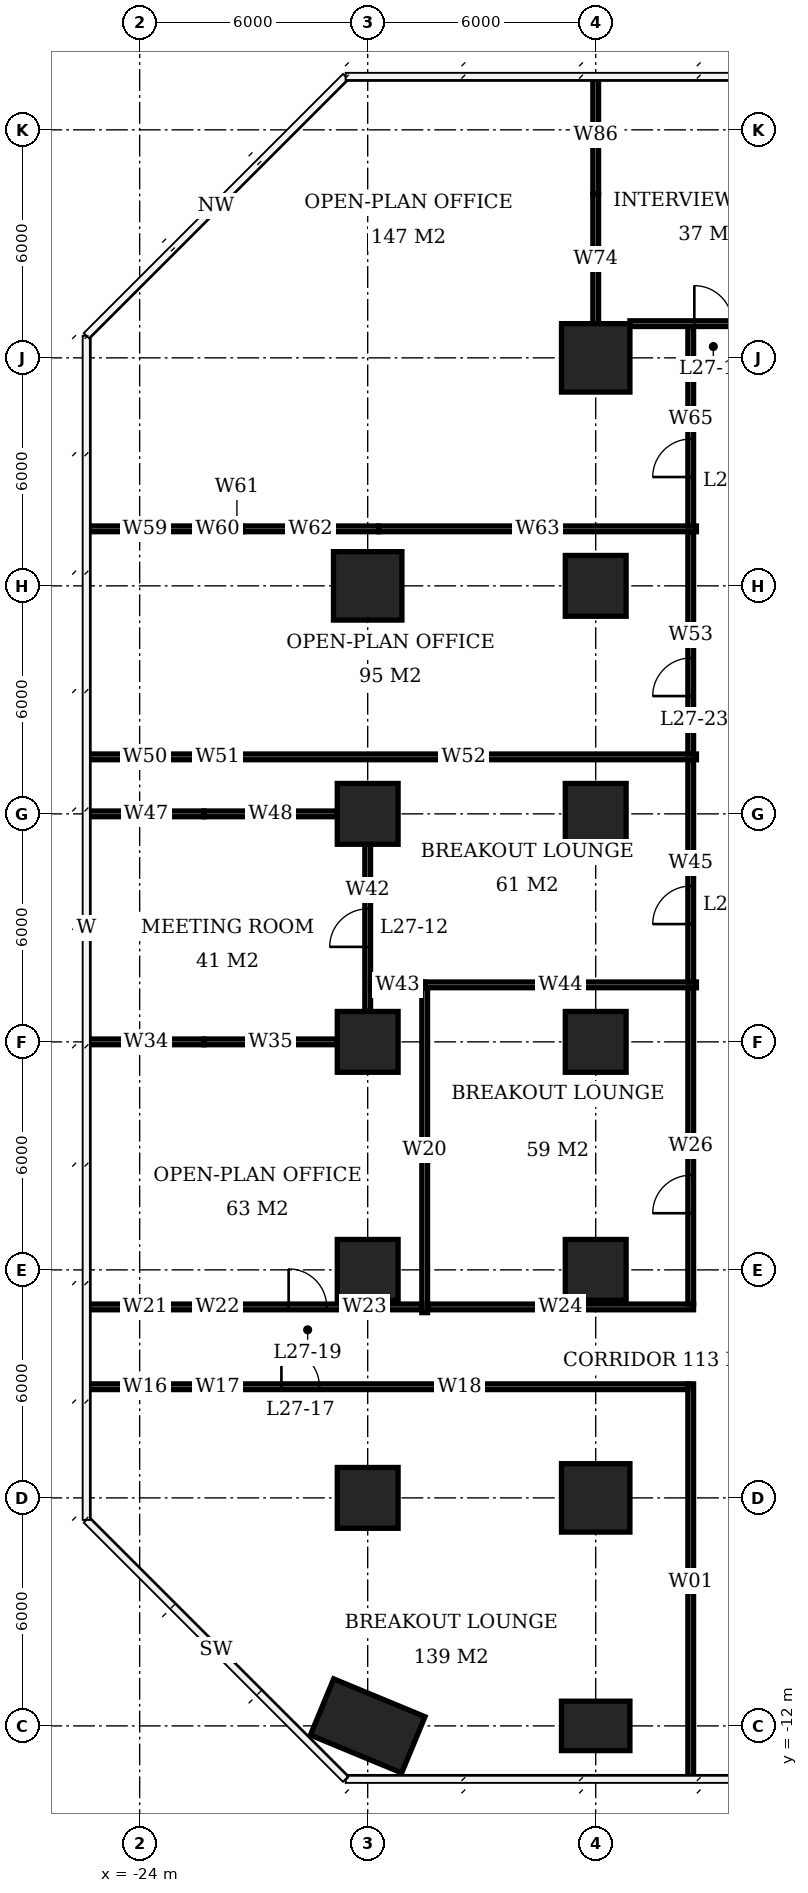
"""IFC4 building model, lengths in metres.
Left out: names, types, materials, properties, quantities, classifications, styles, units other than length and angle.
Written with IfcOpenShell. Run it as: python <this file> out.ifc"""

import sys

from ifc_helpers import new_model, si_unit, direction, frame, frame_2d, origin, origin_2d, place, context, subcontext, project, spatial, rectangle, extrude, element, fill, save


model = new_model("IFC4")
c1 = context("Model", 3, precision=1e-05, world=origin(), true_north=direction((0.0, 1.0)))
c2 = subcontext(c1, "Body", "Model", "MODEL_VIEW")
j1 = project(units=[si_unit("LENGTHUNIT", "METRE"), si_unit("PLANEANGLEUNIT", "RADIAN")], contexts=[c1])
p1 = place(None, origin())
s1 = spatial("IfcSite", under=j1, at=p1, CompositionType="ELEMENT")
p2 = place(p1, origin())
s2 = spatial("IfcBuilding", under=s1, at=p2, CompositionType="ELEMENT")
p3 = place(p2, frame((0.0, 0.0, 113.3)))
s3 = spatial("IfcBuildingStorey", under=s2, at=p3, CompositionType="ELEMENT", Elevation=113.3)
p4 = place(p3, frame((-18.0, -12.0, 0.0), z_axis=(0.0, 0.0, 1.0), x_axis=(-0.923879532511, 0.382683432365, 0.0)))
e1 = element("IfcColumn", 1, at=p4, inside=s3, PredefinedType="COLUMN", context=c2, shape_type="SweptSolid", body=[
    extrude(rectangle(XDim=2.6, YDim=1.6, at=origin_2d()), origin(), (0.0, 0.0, 1.0), 3.9),
])
for number, where, z_axis, x_axis in (
    (2, (-18.0, -6.0, 0.0), (0.0, 0.0, 1.0), (1.0, 0.0, 0.0)),
    (3, (-18.0, 0.0, 0.0), (0.0, 0.0, 1.0), (1.0, 0.0, 0.0)),
    (4, (-18.0, 6.0, 0.0), (0.0, 0.0, 1.0), (1.0, 0.0, 0.0)),
    (5, (-18.0, 12.0, 0.0), (0.0, 0.0, 1.0), (1.0, 0.0, 0.0)),
):
    element("IfcColumn", number, at=place(p3, frame(where, z_axis=z_axis, x_axis=x_axis)), inside=s3, PredefinedType="COLUMN", context=c2, shape_type="SweptSolid", body=[
        extrude(rectangle(XDim=1.6, YDim=1.6, at=origin_2d()), origin(), (0.0, 0.0, 1.0), 3.9),
    ])
p5 = place(p3, frame((-18.0, 18.0, 0.0), z_axis=(0.0, 0.0, 1.0), x_axis=(1.0, 0.0, 0.0)))
e6 = element("IfcColumn", 6, at=p5, inside=s3, PredefinedType="COLUMN", context=c2, shape_type="SweptSolid", body=[
    extrude(rectangle(XDim=1.8, YDim=1.8, at=origin_2d()), origin(), (0.0, 0.0, 1.0), 3.9),
])
p6 = place(p3, frame((-12.0, -12.0, 0.0), z_axis=(0.0, 0.0, 1.0), x_axis=(1.0, 0.0, 0.0)))
e7 = element("IfcColumn", 7, at=p6, inside=s3, PredefinedType="COLUMN", context=c2, shape_type="SweptSolid", body=[
    extrude(rectangle(XDim=1.8, YDim=1.3, at=origin_2d()), origin(), (0.0, 0.0, 1.0), 3.9),
])
p7 = place(p3, frame((-12.0, -6.0, 0.0), z_axis=(0.0, 0.0, 1.0), x_axis=(1.0, 0.0, 0.0)))
e8 = element("IfcColumn", 8, at=p7, inside=s3, PredefinedType="COLUMN", context=c2, shape_type="SweptSolid", body=[
    extrude(rectangle(XDim=1.8, YDim=1.8, at=origin_2d()), origin(), (0.0, 0.0, 1.0), 3.9),
])
for number, where, z_axis, x_axis in (
    (9, (-12.0, 0.0, 0.0), (0.0, 0.0, 1.0), (1.0, 0.0, 0.0)),
    (10, (-12.0, 6.0, 0.0), (0.0, 0.0, 1.0), (1.0, 0.0, 0.0)),
    (11, (-12.0, 12.0, 0.0), (0.0, 0.0, 1.0), (1.0, 0.0, 0.0)),
    (12, (-12.0, 18.0, 0.0), (0.0, 0.0, 1.0), (1.0, 0.0, 0.0)),
):
    element("IfcColumn", number, at=place(p3, frame(where, z_axis=z_axis, x_axis=x_axis)), inside=s3, PredefinedType="COLUMN", context=c2, shape_type="SweptSolid", body=[
        extrude(rectangle(XDim=1.6, YDim=1.6, at=origin_2d()), origin(), (0.0, 0.0, 1.0), 3.9),
    ])
p8 = place(p3, frame((-12.0, 24.0, 0.0), z_axis=(0.0, 0.0, 1.0), x_axis=(1.0, 0.0, 0.0)))
e13 = element("IfcColumn", 13, at=p8, inside=s3, PredefinedType="COLUMN", context=c2, shape_type="SweptSolid", body=[
    extrude(rectangle(XDim=1.8, YDim=1.8, at=origin_2d()), origin(), (0.0, 0.0, 1.0), 3.9),
])
p9 = place(p3, frame((-25.35, 6.0, 0.0), z_axis=(0.0, 0.0, 1.0), x_axis=(1.0, 0.0, 0.0)))
e14 = element("IfcWall", 14, at=p9, inside=s3, PredefinedType="PARTITIONING", context=c2, shape_type="SweptSolid", body=[
    extrude(rectangle(XDim=3.04, YDim=0.15, at=frame_2d((1.52, 0.0))), origin(), (0.0, 0.0, 1.0), 3.65),
])
p10 = place(p3, frame((-22.31, 6.0, 0.0), z_axis=(0.0, 0.0, 1.0), x_axis=(1.0, 0.0, 0.0)))
e15 = element("IfcWall", 15, at=p10, inside=s3, PredefinedType="PARTITIONING", context=c2, shape_type="SweptSolid", body=[
    extrude(rectangle(XDim=3.51, YDim=0.15, at=frame_2d((1.755, 0.0))), origin(), (0.0, 0.0, 1.0), 2.65),
])
p11 = place(p3, frame((-25.35, 12.0, 0.0), z_axis=(0.0, 0.0, 1.0), x_axis=(1.0, 0.0, 0.0)))
e16 = element("IfcWall", 16, at=p11, inside=s3, PredefinedType="PARTITIONING", context=c2, shape_type="SweptSolid", body=[
    extrude(rectangle(XDim=3.04, YDim=0.15, at=frame_2d((1.52, 0.0))), origin(), (0.0, 0.0, 1.0), 3.65),
])
p12 = place(p3, frame((-22.31, 12.0, 0.0), z_axis=(0.0, 0.0, 1.0), x_axis=(1.0, 0.0, 0.0)))
e17 = element("IfcWall", 17, at=p12, inside=s3, PredefinedType="PARTITIONING", context=c2, shape_type="SweptSolid", body=[
    extrude(rectangle(XDim=3.51, YDim=0.15, at=frame_2d((1.755, 0.0))), origin(), (0.0, 0.0, 1.0), 2.65),
])
p13 = place(p3, frame((-11.1, 24.9, 0.0), z_axis=(0.0, 0.0, 1.0), x_axis=(1.0, 0.0, 0.0)))
e18 = element("IfcWall", 18, at=p13, inside=s3, PredefinedType="PARTITIONING", context=c2, shape_type="SweptSolid", body=[
    extrude(rectangle(XDim=4.39, YDim=0.15, at=frame_2d((2.195, 0.0))), origin(), (0.0, 0.0, 1.0), 3.65),
])
p14 = place(p13, frame((1.695, 0.0, 0.0)))
e19 = element("IfcOpeningElement", 19, at=p14, cuts=e18, PredefinedType="OPENING", context=c2, shape_type="SweptSolid", body=[
    extrude(rectangle(XDim=1.0, YDim=2.1, at=frame_2d((0.5, 1.05))), frame((0.0, 0.085, 0.0), z_axis=(0.0, -1.0, 0.0), x_axis=(1.0, 0.0, 0.0)), (0.0, 0.0, 1.0), 0.17),
])
p15 = place(p3, frame((-18.0, 6.8, 0.0), z_axis=(0.0, 0.0, 1.0), x_axis=(0.0, 1.0, 0.0)))
e20 = element("IfcWall", 20, at=p15, inside=s3, PredefinedType="PARTITIONING", context=c2, shape_type="SweptSolid", body=[
    extrude(rectangle(XDim=4.4, YDim=0.15, at=frame_2d((2.2, 0.0))), origin(), (0.0, 0.0, 1.0), 3.65),
])
p16 = place(p15, frame((1.7, 0.0, 0.0)))
e21 = element("IfcOpeningElement", 21, at=p16, cuts=e20, PredefinedType="OPENING", context=c2, shape_type="SweptSolid", body=[
    extrude(rectangle(XDim=1.0, YDim=2.1, at=frame_2d((0.5, 1.05))), frame((0.0, 0.085, 0.0), z_axis=(0.0, -1.0, 0.0), x_axis=(1.0, 0.0, 0.0)), (0.0, 0.0, 1.0), 0.17),
])
p17 = place(p3, frame((-12.0, 24.9, 0.0), z_axis=(0.0, 0.0, 1.0), x_axis=(0.0, 1.0, 0.0)))
e22 = element("IfcWall", 22, at=p17, inside=s3, PredefinedType="PARTITIONING", context=c2, shape_type="SweptSolid", body=[
    extrude(rectangle(XDim=3.41, YDim=0.15, at=frame_2d((1.705, 0.0))), origin(), (0.0, 0.0, 1.0), 2.65),
])
for number, where, z_axis, x_axis in (
    (23, (-12.0, 28.31, 0.0), (0.0, 0.0, 1.0), (0.0, 1.0, 0.0)),
    (24, (-25.4, -3.075, 0.0), (0.0, 0.0, 1.0), (1.0, 0.0, 0.0)),
):
    element("IfcWall", number, at=place(p3, frame(where, z_axis=z_axis, x_axis=x_axis)), inside=s3, PredefinedType="PARTITIONING", context=c2, shape_type="SweptSolid", body=[
        extrude(rectangle(XDim=3.09, YDim=0.15, at=frame_2d((1.545, 0.0))), origin(), (0.0, 0.0, 1.0), 3.65),
    ])
p18 = place(p3, frame((-22.31, -3.075, 0.0), z_axis=(0.0, 0.0, 1.0), x_axis=(1.0, 0.0, 0.0)))
e25 = element("IfcWall", 25, at=p18, inside=s3, PredefinedType="PARTITIONING", context=c2, shape_type="SweptSolid", body=[
    extrude(rectangle(XDim=0.72, YDim=0.15, at=frame_2d((0.36, 0.0))), origin(), (0.0, 0.0, 1.0), 2.65),
])
p19 = place(p3, frame((-21.59, -3.075, 0.0), z_axis=(0.0, 0.0, 1.0), x_axis=(1.0, 0.0, 0.0)))
e26 = element("IfcWall", 26, at=p19, inside=s3, PredefinedType="PARTITIONING", context=c2, shape_type="SweptSolid", body=[
    extrude(rectangle(XDim=12.015, YDim=0.15, at=frame_2d((6.008, 0.0))), origin(), (0.0, 0.0, 1.0), 3.65),
])
p20 = place(p19, frame((1.32, 0.0, 0.0)))
e27 = element("IfcOpeningElement", 27, at=p20, cuts=e26, PredefinedType="OPENING", context=c2, shape_type="SweptSolid", body=[
    extrude(rectangle(XDim=1.0, YDim=2.1, at=frame_2d((0.5, 1.05))), frame((0.0, 0.085, 0.0), z_axis=(0.0, -1.0, 0.0), x_axis=(1.0, 0.0, 0.0)), (0.0, 0.0, 1.0), 0.17),
])
p21 = place(p3, frame((-25.4, -0.975, 0.0), z_axis=(0.0, 0.0, 1.0), x_axis=(1.0, 0.0, 0.0)))
e28 = element("IfcWall", 28, at=p21, inside=s3, PredefinedType="PARTITIONING", context=c2, shape_type="SweptSolid", body=[
    extrude(rectangle(XDim=3.09, YDim=0.15, at=frame_2d((1.545, 0.0))), origin(), (0.0, 0.0, 1.0), 3.65),
])
p22 = place(p3, frame((-22.31, -0.975, 0.0), z_axis=(0.0, 0.0, 1.0), x_axis=(1.0, 0.0, 0.0)))
e29 = element("IfcWall", 29, at=p22, inside=s3, PredefinedType="PARTITIONING", context=c2, shape_type="SweptSolid", body=[
    extrude(rectangle(XDim=0.72, YDim=0.15, at=frame_2d((0.36, 0.0))), origin(), (0.0, 0.0, 1.0), 2.65),
])
p23 = place(p3, frame((-21.59, -0.975, 0.0), z_axis=(0.0, 0.0, 1.0), x_axis=(1.0, 0.0, 0.0)))
e30 = element("IfcWall", 30, at=p23, inside=s3, PredefinedType="PARTITIONING", context=c2, shape_type="SweptSolid", body=[
    extrude(rectangle(XDim=5.015, YDim=0.15, at=frame_2d((2.508, 0.0))), origin(), (0.0, 0.0, 1.0), 3.65),
])
p24 = place(p23, frame((1.51, 0.0, 0.0)))
e31 = element("IfcOpeningElement", 31, at=p24, cuts=e30, PredefinedType="OPENING", context=c2, shape_type="SweptSolid", body=[
    extrude(rectangle(XDim=1.0, YDim=2.1, at=frame_2d((0.5, 1.05))), frame((0.0, 0.085, 0.0), z_axis=(0.0, -1.0, 0.0), x_axis=(1.0, 0.0, 0.0)), (0.0, 0.0, 1.0), 0.17),
])
p25 = place(p3, frame((-25.4, 13.5, 0.0), z_axis=(0.0, 0.0, 1.0), x_axis=(1.0, 0.0, 0.0)))
e32 = element("IfcWall", 32, at=p25, inside=s3, PredefinedType="PARTITIONING", context=c2, shape_type="SweptSolid", body=[
    extrude(rectangle(XDim=3.09, YDim=0.15, at=frame_2d((1.545, 0.0))), origin(), (0.0, 0.0, 1.0), 3.65),
])
p26 = place(p3, frame((-22.31, 13.5, 0.0), z_axis=(0.0, 0.0, 1.0), x_axis=(1.0, 0.0, 0.0)))
e33 = element("IfcWall", 33, at=p26, inside=s3, PredefinedType="PARTITIONING", context=c2, shape_type="SweptSolid", body=[
    extrude(rectangle(XDim=0.72, YDim=0.15, at=frame_2d((0.36, 0.0))), origin(), (0.0, 0.0, 1.0), 2.65),
])
p27 = place(p3, frame((-21.59, 13.5, 0.0), z_axis=(0.0, 0.0, 1.0), x_axis=(1.0, 0.0, 0.0)))
e34 = element("IfcWall", 34, at=p27, inside=s3, PredefinedType="PARTITIONING", context=c2, shape_type="SweptSolid", body=[
    extrude(rectangle(XDim=12.24, YDim=0.15, at=frame_2d((6.12, 0.0))), origin(), (0.0, 0.0, 1.0), 3.65),
])
p28 = place(p3, frame((-25.4, 19.5, 0.0), z_axis=(0.0, 0.0, 1.0), x_axis=(1.0, 0.0, 0.0)))
e35 = element("IfcWall", 35, at=p28, inside=s3, PredefinedType="PARTITIONING", context=c2, shape_type="SweptSolid", body=[
    extrude(rectangle(XDim=3.09, YDim=0.15, at=frame_2d((1.545, 0.0))), origin(), (0.0, 0.0, 1.0), 3.65),
])
p29 = place(p3, frame((-22.31, 19.5, 0.0), z_axis=(0.0, 0.0, 1.0), x_axis=(1.0, 0.0, 0.0)))
e36 = element("IfcWall", 36, at=p29, inside=s3, PredefinedType="PARTITIONING", context=c2, shape_type="SweptSolid", body=[
    extrude(rectangle(XDim=0.72, YDim=0.15, at=frame_2d((0.36, 0.0))), origin(), (0.0, 0.0, 1.0), 2.65),
])
p30 = place(p3, frame((-21.59, 19.5, 0.0), z_axis=(0.0, 0.0, 1.0), x_axis=(1.0, 0.0, 0.0)))
e37 = element("IfcWall", 37, at=p30, inside=s3, PredefinedType="PARTITIONING", context=c2, shape_type="SweptSolid", body=[
    extrude(rectangle(XDim=0.298, YDim=0.15, at=frame_2d((0.149, 0.0))), origin(), (0.0, 0.0, 1.0), 3.65),
])
p31 = place(p3, frame((-21.292, 19.5, 0.0), z_axis=(0.0, 0.0, 1.0), x_axis=(1.0, 0.0, 0.0)))
e38 = element("IfcWall", 38, at=p31, inside=s3, PredefinedType="PARTITIONING", context=c2, shape_type="SweptSolid", body=[
    extrude(rectangle(XDim=3.584, YDim=0.15, at=frame_2d((1.792, 0.0))), origin(), (0.0, 0.0, 1.0), 2.65),
])
p32 = place(p3, frame((-17.708, 19.5, 0.0), z_axis=(0.0, 0.0, 1.0), x_axis=(1.0, 0.0, 0.0)))
e39 = element("IfcWall", 39, at=p32, inside=s3, PredefinedType="PARTITIONING", context=c2, shape_type="SweptSolid", body=[
    extrude(rectangle(XDim=8.358, YDim=0.15, at=frame_2d((4.179, 0.0))), origin(), (0.0, 0.0, 1.0), 3.65),
])
p33 = place(p3, frame((-17.925, 7.5, 0.0), z_axis=(0.0, 0.0, 1.0), x_axis=(1.0, 0.0, 0.0)))
e40 = element("IfcWall", 40, at=p33, inside=s3, PredefinedType="PARTITIONING", context=c2, shape_type="SweptSolid", body=[
    extrude(rectangle(XDim=1.425, YDim=0.15, at=frame_2d((0.712, 0.0))), origin(), (0.0, 0.0, 1.0), 3.65),
])
p34 = place(p3, frame((-16.5, -1.125, 0.0), z_axis=(0.0, 0.0, 1.0), x_axis=(0.0, 1.0, 0.0)))
e41 = element("IfcWall", 41, at=p34, inside=s3, PredefinedType="PARTITIONING", context=c2, shape_type="SweptSolid", body=[
    extrude(rectangle(XDim=8.55, YDim=0.15, at=frame_2d((4.275, 0.0))), origin(), (0.0, 0.0, 1.0), 3.65),
])
p35 = place(p3, frame((-16.425, -0.975, 0.0), z_axis=(0.0, 0.0, 1.0), x_axis=(1.0, 0.0, 0.0)))
e42 = element("IfcWall", 42, at=p35, inside=s3, PredefinedType="PARTITIONING", context=c2, shape_type="SweptSolid", body=[
    extrude(rectangle(XDim=7.0, YDim=0.15, at=frame_2d((3.5, 0.0))), origin(), (0.0, 0.0, 1.0), 3.65),
])
p36 = place(p3, frame((-16.5, 7.5, 0.0), z_axis=(0.0, 0.0, 1.0), x_axis=(1.0, 0.0, 0.0)))
e43 = element("IfcWall", 43, at=p36, inside=s3, PredefinedType="PARTITIONING", context=c2, shape_type="SweptSolid", body=[
    extrude(rectangle(XDim=7.15, YDim=0.15, at=frame_2d((3.575, 0.0))), origin(), (0.0, 0.0, 1.0), 3.65),
])
p37 = place(p3, frame((-9.5, -13.4, 0.0), z_axis=(0.0, 0.0, 1.0), x_axis=(0.0, 1.0, 0.0)))
e44 = element("IfcWall", 44, at=p37, inside=s3, PredefinedType="PARTITIONING", context=c2, shape_type="SweptSolid", body=[
    extrude(rectangle(XDim=10.4, YDim=0.15, at=frame_2d((5.2, 0.0))), origin(), (0.0, 0.0, 1.0), 3.65),
])
p38 = place(p3, frame((-9.5, -0.9, 0.0), z_axis=(0.0, 0.0, 1.0), x_axis=(0.0, 1.0, 0.0)))
e45 = element("IfcWall", 45, at=p38, inside=s3, PredefinedType="PARTITIONING", context=c2, shape_type="SweptSolid", body=[
    extrude(rectangle(XDim=8.325, YDim=0.15, at=frame_2d((4.163, 0.0))), origin(), (0.0, 0.0, 1.0), 3.65),
])
p39 = place(p38, frame((2.391, 0.0, 0.0)))
e46 = element("IfcOpeningElement", 46, at=p39, cuts=e45, PredefinedType="OPENING", context=c2, shape_type="SweptSolid", body=[
    extrude(rectangle(XDim=1.0, YDim=2.1, at=frame_2d((0.5, 1.05))), frame((0.0, 0.085, 0.0), z_axis=(0.0, -1.0, 0.0), x_axis=(1.0, 0.0, 0.0)), (0.0, 0.0, 1.0), 0.17),
])
p40 = place(p3, frame((-9.5, 7.575, 0.0), z_axis=(0.0, 0.0, 1.0), x_axis=(0.0, 1.0, 0.0)))
e47 = element("IfcWall", 47, at=p40, inside=s3, PredefinedType="PARTITIONING", context=c2, shape_type="SweptSolid", body=[
    extrude(rectangle(XDim=5.85, YDim=0.15, at=frame_2d((2.925, 0.0))), origin(), (0.0, 0.0, 1.0), 3.65),
])
p41 = place(p40, frame((1.525, 0.0, 0.0)))
e48 = element("IfcOpeningElement", 48, at=p41, cuts=e47, PredefinedType="OPENING", context=c2, shape_type="SweptSolid", body=[
    extrude(rectangle(XDim=1.0, YDim=2.1, at=frame_2d((0.5, 1.05))), frame((0.0, 0.085, 0.0), z_axis=(0.0, -1.0, 0.0), x_axis=(1.0, 0.0, 0.0)), (0.0, 0.0, 1.0), 0.17),
])
p42 = place(p3, frame((-9.5, 13.575, 0.0), z_axis=(0.0, 0.0, 1.0), x_axis=(0.0, 1.0, 0.0)))
e49 = element("IfcWall", 49, at=p42, inside=s3, PredefinedType="PARTITIONING", context=c2, shape_type="SweptSolid", body=[
    extrude(rectangle(XDim=5.85, YDim=0.15, at=frame_2d((2.925, 0.0))), origin(), (0.0, 0.0, 1.0), 3.65),
])
p43 = place(p42, frame((1.525, 0.0, 0.0)))
e50 = element("IfcOpeningElement", 50, at=p43, cuts=e49, PredefinedType="OPENING", context=c2, shape_type="SweptSolid", body=[
    extrude(rectangle(XDim=1.0, YDim=2.1, at=frame_2d((0.5, 1.05))), frame((0.0, 0.085, 0.0), z_axis=(0.0, -1.0, 0.0), x_axis=(1.0, 0.0, 0.0)), (0.0, 0.0, 1.0), 0.17),
])
p44 = place(p3, frame((-9.5, 19.575, 0.0), z_axis=(0.0, 0.0, 1.0), x_axis=(0.0, 1.0, 0.0)))
e51 = element("IfcWall", 51, at=p44, inside=s3, PredefinedType="PARTITIONING", context=c2, shape_type="SweptSolid", body=[
    extrude(rectangle(XDim=5.25, YDim=0.15, at=frame_2d((2.625, 0.0))), origin(), (0.0, 0.0, 1.0), 3.65),
])
p45 = place(p44, frame((1.289, 0.0, 0.0)))
e52 = element("IfcOpeningElement", 52, at=p45, cuts=e51, PredefinedType="OPENING", context=c2, shape_type="SweptSolid", body=[
    extrude(rectangle(XDim=1.0, YDim=2.1, at=frame_2d((0.5, 1.05))), frame((0.0, 0.085, 0.0), z_axis=(0.0, -1.0, 0.0), x_axis=(1.0, 0.0, 0.0)), (0.0, 0.0, 1.0), 0.17),
])
p46 = place(p16, origin())
e53 = element("IfcDoor", 53, at=p46, inside=s3, OperationType="SINGLE_SWING_LEFT", PredefinedType="DOOR", context=c2, shape_type="SweptSolid", body=[
    extrude(rectangle(XDim=1.0, YDim=2.1, at=frame_2d((0.5, 1.05))), frame((0.0, 0.025, 0.0), z_axis=(0.0, -1.0, 0.0), x_axis=(1.0, 0.0, 0.0)), (0.0, 0.0, 1.0), 0.05),
])
fill(e21, e53)
p47 = place(p14, origin())
e54 = element("IfcDoor", 54, at=p47, inside=s3, OperationType="SINGLE_SWING_LEFT", PredefinedType="DOOR", context=c2, shape_type="SweptSolid", body=[
    extrude(rectangle(XDim=1.0, YDim=2.1, at=frame_2d((0.5, 1.05))), frame((0.0, 0.025, 0.0), z_axis=(0.0, -1.0, 0.0), x_axis=(1.0, 0.0, 0.0)), (0.0, 0.0, 1.0), 0.05),
])
fill(e19, e54)
p48 = place(p20, origin())
e55 = element("IfcDoor", 55, at=p48, inside=s3, OperationType="SINGLE_SWING_LEFT", PredefinedType="DOOR", context=c2, shape_type="SweptSolid", body=[
    extrude(rectangle(XDim=1.0, YDim=2.1, at=frame_2d((0.5, 1.05))), frame((0.0, 0.025, 0.0), z_axis=(0.0, -1.0, 0.0), x_axis=(1.0, 0.0, 0.0)), (0.0, 0.0, 1.0), 0.05),
])
fill(e27, e55)
p49 = place(p24, origin())
e56 = element("IfcDoor", 56, at=p49, inside=s3, OperationType="SINGLE_SWING_LEFT", PredefinedType="DOOR", context=c2, shape_type="SweptSolid", body=[
    extrude(rectangle(XDim=1.0, YDim=2.1, at=frame_2d((0.5, 1.05))), frame((0.0, 0.025, 0.0), z_axis=(0.0, -1.0, 0.0), x_axis=(1.0, 0.0, 0.0)), (0.0, 0.0, 1.0), 0.05),
])
fill(e31, e56)
p50 = place(p39, origin())
e57 = element("IfcDoor", 57, at=p50, inside=s3, OperationType="SINGLE_SWING_LEFT", PredefinedType="DOOR", context=c2, shape_type="SweptSolid", body=[
    extrude(rectangle(XDim=1.0, YDim=2.1, at=frame_2d((0.5, 1.05))), frame((0.0, 0.025, 0.0), z_axis=(0.0, -1.0, 0.0), x_axis=(1.0, 0.0, 0.0)), (0.0, 0.0, 1.0), 0.05),
])
fill(e46, e57)
p51 = place(p41, origin())
e58 = element("IfcDoor", 58, at=p51, inside=s3, OperationType="SINGLE_SWING_LEFT", PredefinedType="DOOR", context=c2, shape_type="SweptSolid", body=[
    extrude(rectangle(XDim=1.0, YDim=2.1, at=frame_2d((0.5, 1.05))), frame((0.0, 0.025, 0.0), z_axis=(0.0, -1.0, 0.0), x_axis=(1.0, 0.0, 0.0)), (0.0, 0.0, 1.0), 0.05),
])
fill(e48, e58)
p52 = place(p43, origin())
e59 = element("IfcDoor", 59, at=p52, inside=s3, OperationType="SINGLE_SWING_LEFT", PredefinedType="DOOR", context=c2, shape_type="SweptSolid", body=[
    extrude(rectangle(XDim=1.0, YDim=2.1, at=frame_2d((0.5, 1.05))), frame((0.0, 0.025, 0.0), z_axis=(0.0, -1.0, 0.0), x_axis=(1.0, 0.0, 0.0)), (0.0, 0.0, 1.0), 0.05),
])
fill(e50, e59)
p53 = place(p45, origin())
e60 = element("IfcDoor", 60, at=p53, inside=s3, OperationType="SINGLE_SWING_LEFT", PredefinedType="DOOR", context=c2, shape_type="SweptSolid", body=[
    extrude(rectangle(XDim=1.0, YDim=2.1, at=frame_2d((0.5, 1.05))), frame((0.0, 0.025, 0.0), z_axis=(0.0, -1.0, 0.0), x_axis=(1.0, 0.0, 0.0)), (0.0, 0.0, 1.0), 0.05),
])
fill(e52, e60)
save(model, sys.argv[1])
